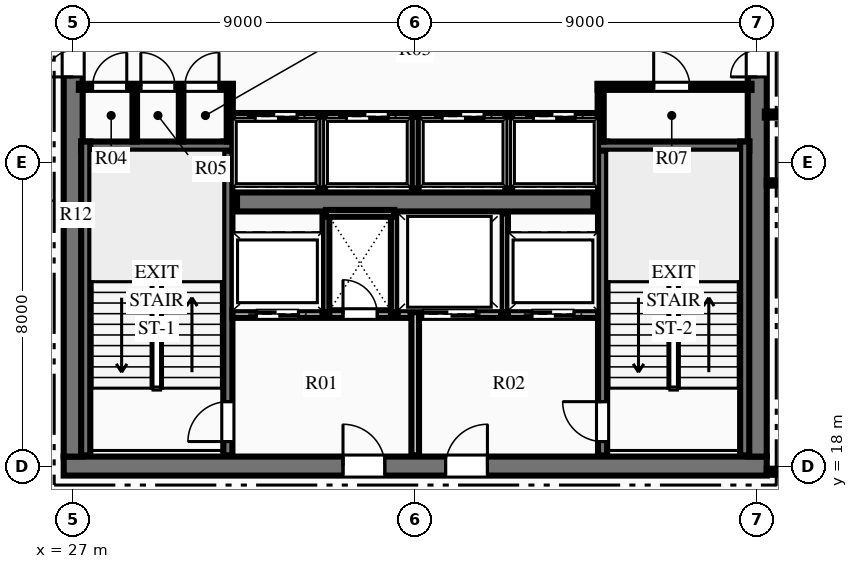
"""IFC4 building model, lengths in metres.
Left out: names, types, materials, properties, quantities, classifications, styles, units other than length and angle.
Written with IfcOpenShell. Run it as: python <this file> out.ifc"""

import sys

from ifc_helpers import new_model, si_unit, direction, frame, frame_2d, origin, place, context, subcontext, project, spatial, rectangle, extrude, element, fill, save


model = new_model("IFC4")
c1 = context("Model", 3, precision=1e-05, world=origin(), true_north=direction((0.0, 1.0)))
c2 = subcontext(c1, "Body", "Model", "MODEL_VIEW")
j1 = project(units=[si_unit("LENGTHUNIT", "METRE"), si_unit("PLANEANGLEUNIT", "RADIAN")], contexts=[c1])
p1 = place(None, origin())
s1 = spatial("IfcSite", under=j1, at=p1, CompositionType="ELEMENT")
p2 = place(p1, origin())
s2 = spatial("IfcBuilding", under=s1, at=p2, CompositionType="ELEMENT")
p3 = place(p2, frame((0.0, 0.0, 163.2)))
s3 = spatial("IfcBuildingStorey", under=s2, at=p3, CompositionType="ELEMENT", Elevation=163.2)
p4 = place(p3, frame((26.75, 18.0, 0.0), z_axis=(0.0, 0.0, 1.0), x_axis=(1.0, 0.0, 0.0)))
e1 = element("IfcWall", 1, at=p4, inside=s3, PredefinedType="SHEAR", context=c2, shape_type="SweptSolid", body=[
    extrude(rectangle(XDim=18.5, YDim=0.5, at=frame_2d((9.25, 0.0))), origin(), (0.0, 0.0, 1.0), 3.75),
])
p5 = place(p4, frame((7.35, 0.0, 0.0)))
e2 = element("IfcOpeningElement", 2, at=p5, cuts=e1, PredefinedType="OPENING", context=c2, shape_type="SweptSolid", body=[
    extrude(rectangle(XDim=1.1, YDim=2.15, at=frame_2d((0.55, 1.075))), frame((0.0, 0.26, 0.0), z_axis=(0.0, -1.0, 0.0), x_axis=(1.0, 0.0, 0.0)), (0.0, 0.0, 1.0), 0.52),
])
p6 = place(p4, frame((10.05, 0.0, 0.0)))
e3 = element("IfcOpeningElement", 3, at=p6, cuts=e1, PredefinedType="OPENING", context=c2, shape_type="SweptSolid", body=[
    extrude(rectangle(XDim=1.1, YDim=2.15, at=frame_2d((0.55, 1.075))), frame((0.0, 0.26, 0.0), z_axis=(0.0, -1.0, 0.0), x_axis=(1.0, 0.0, 0.0)), (0.0, 0.0, 1.0), 0.52),
])
p7 = place(p3, frame((27.0, 18.25, 0.0), z_axis=(0.0, 0.0, 1.0), x_axis=(0.0, 1.0, 0.0)))
e4 = element("IfcWall", 4, at=p7, inside=s3, PredefinedType="SHEAR", context=c2, shape_type="SweptSolid", body=[
    extrude(rectangle(XDim=15.5, YDim=0.5, at=frame_2d((7.75, 0.0))), origin(), (0.0, 0.0, 1.0), 3.75),
])
p8 = place(p7, frame((9.99, 0.0, 0.0)))
e5 = element("IfcOpeningElement", 5, at=p8, cuts=e4, PredefinedType="OPENING", context=c2, shape_type="SweptSolid", body=[
    extrude(rectangle(XDim=1.4, YDim=2.2, at=frame_2d((0.7, 1.1))), frame((0.0, 0.26, 0.0), z_axis=(0.0, -1.0, 0.0), x_axis=(1.0, 0.0, 0.0)), (0.0, 0.0, 1.0), 0.52),
])
p9 = place(p3, frame((45.0, 18.25, 0.0), z_axis=(0.0, 0.0, 1.0), x_axis=(0.0, 1.0, 0.0)))
e6 = element("IfcWall", 6, at=p9, inside=s3, PredefinedType="SHEAR", context=c2, shape_type="SweptSolid", body=[
    extrude(rectangle(XDim=15.5, YDim=0.5, at=frame_2d((7.75, 0.0))), origin(), (0.0, 0.0, 1.0), 3.75),
])
p10 = place(p9, frame((9.99, 0.0, 0.0)))
e7 = element("IfcOpeningElement", 7, at=p10, cuts=e6, PredefinedType="OPENING", context=c2, shape_type="SweptSolid", body=[
    extrude(rectangle(XDim=1.4, YDim=2.2, at=frame_2d((0.7, 1.1))), frame((0.0, 0.26, 0.0), z_axis=(0.0, -1.0, 0.0), x_axis=(1.0, 0.0, 0.0)), (0.0, 0.0, 1.0), 0.52),
])
p11 = place(p3, frame((31.31, 24.95, 0.0), z_axis=(0.0, 0.0, 1.0), x_axis=(1.0, 0.0, 0.0)))
e8 = element("IfcWall", 8, at=p11, inside=s3, PredefinedType="SHEAR", context=c2, shape_type="SweptSolid", body=[
    extrude(rectangle(XDim=9.38, YDim=0.5, at=frame_2d((4.69, 0.0))), origin(), (0.0, 0.0, 1.0), 3.75),
])
p12 = place(p3, frame((31.07, 18.28, 0.0), z_axis=(0.0, 0.0, 1.0), x_axis=(0.0, 1.0, 0.0)))
e9 = element("IfcWall", 9, at=p12, inside=s3, PredefinedType="SHEAR", context=c2, shape_type="SweptSolid", body=[
    extrude(rectangle(XDim=8.26, YDim=0.24, at=frame_2d((4.13, 0.0))), origin(), (0.0, 0.0, 1.0), 3.75),
])
p13 = place(p12, frame((0.365, 0.0, 0.0)))
e10 = element("IfcOpeningElement", 10, at=p13, cuts=e9, PredefinedType="OPENING", context=c2, shape_type="SweptSolid", body=[
    extrude(rectangle(XDim=1.05, YDim=2.15, at=frame_2d((0.525, 1.075))), frame((0.0, 0.13, 0.0), z_axis=(0.0, -1.0, 0.0), x_axis=(1.0, 0.0, 0.0)), (0.0, 0.0, 1.0), 0.26),
])
p14 = place(p3, frame((27.21, 26.42, 0.0), z_axis=(0.0, 0.0, 1.0), x_axis=(1.0, 0.0, 0.0)))
e11 = element("IfcWall", 11, at=p14, inside=s3, PredefinedType="SHEAR", context=c2, shape_type="SweptSolid", body=[
    extrude(rectangle(XDim=3.98, YDim=0.24, at=frame_2d((1.99, 0.0))), origin(), (0.0, 0.0, 1.0), 3.75),
])
p15 = place(p3, frame((27.33, 18.28, 0.0), z_axis=(0.0, 0.0, 1.0), x_axis=(0.0, 1.0, 0.0)))
e12 = element("IfcWall", 12, at=p15, inside=s3, PredefinedType="SHEAR", context=c2, shape_type="SweptSolid", body=[
    extrude(rectangle(XDim=8.26, YDim=0.24, at=frame_2d((4.13, 0.0))), origin(), (0.0, 0.0, 1.0), 3.75),
])
p16 = place(p3, frame((40.93, 18.28, 0.0), z_axis=(0.0, 0.0, 1.0), x_axis=(0.0, 1.0, 0.0)))
e13 = element("IfcWall", 13, at=p16, inside=s3, PredefinedType="SHEAR", context=c2, shape_type="SweptSolid", body=[
    extrude(rectangle(XDim=8.26, YDim=0.24, at=frame_2d((4.13, 0.0))), origin(), (0.0, 0.0, 1.0), 3.75),
])
p17 = place(p16, frame((0.365, 0.0, 0.0)))
e14 = element("IfcOpeningElement", 14, at=p17, cuts=e13, PredefinedType="OPENING", context=c2, shape_type="SweptSolid", body=[
    extrude(rectangle(XDim=1.05, YDim=2.15, at=frame_2d((0.525, 1.075))), frame((0.0, 0.13, 0.0), z_axis=(0.0, -1.0, 0.0), x_axis=(1.0, 0.0, 0.0)), (0.0, 0.0, 1.0), 0.26),
])
p18 = place(p3, frame((40.81, 26.42, 0.0), z_axis=(0.0, 0.0, 1.0), x_axis=(1.0, 0.0, 0.0)))
e15 = element("IfcWall", 15, at=p18, inside=s3, PredefinedType="SHEAR", context=c2, shape_type="SweptSolid", body=[
    extrude(rectangle(XDim=3.98, YDim=0.24, at=frame_2d((1.99, 0.0))), origin(), (0.0, 0.0, 1.0), 3.75),
])
p19 = place(p3, frame((44.67, 18.28, 0.0), z_axis=(0.0, 0.0, 1.0), x_axis=(0.0, 1.0, 0.0)))
e16 = element("IfcWall", 16, at=p19, inside=s3, PredefinedType="SHEAR", context=c2, shape_type="SweptSolid", body=[
    extrude(rectangle(XDim=8.26, YDim=0.24, at=frame_2d((4.13, 0.0))), origin(), (0.0, 0.0, 1.0), 3.75),
])
p20 = place(p3, frame((36.0, 18.28, 0.0), z_axis=(0.0, 0.0, 1.0), x_axis=(0.0, 1.0, 0.0)))
e17 = element("IfcWall", 17, at=p20, inside=s3, PredefinedType="PARTITIONING", context=c2, shape_type="SweptSolid", body=[
    extrude(rectangle(XDim=3.77, YDim=0.2, at=frame_2d((1.885, 0.0))), origin(), (0.0, 0.0, 1.0), 3.46),
])
p21 = place(p3, frame((31.19, 22.0, 0.0), z_axis=(0.0, 0.0, 1.0), x_axis=(1.0, 0.0, 0.0)))
e18 = element("IfcWall", 18, at=p21, inside=s3, PredefinedType="PARTITIONING", context=c2, shape_type="SweptSolid", body=[
    extrude(rectangle(XDim=4.69, YDim=0.2, at=frame_2d((2.345, 0.0))), origin(), (0.0, 0.0, 1.0), 3.46),
])
p22 = place(p21, frame((2.91, 0.0, 0.0)))
e19 = element("IfcOpeningElement", 19, at=p22, cuts=e18, PredefinedType="OPENING", context=c2, shape_type="SweptSolid", body=[
    extrude(rectangle(XDim=0.9, YDim=2.15, at=frame_2d((0.45, 1.075))), frame((0.0, 0.11, 0.0), z_axis=(0.0, -1.0, 0.0), x_axis=(1.0, 0.0, 0.0)), (0.0, 0.0, 1.0), 0.22),
])
p23 = place(p21, frame((0.635, 0.0, 0.0)))
e20 = element("IfcOpeningElement", 20, at=p23, cuts=e18, PredefinedType="OPENING", context=c2, shape_type="SweptSolid", body=[
    extrude(rectangle(XDim=1.1, YDim=2.15, at=frame_2d((0.55, 1.075))), frame((0.0, 0.11, 0.0), z_axis=(0.0, -1.0, 0.0), x_axis=(1.0, 0.0, 0.0)), (0.0, 0.0, 1.0), 0.22),
])
p24 = place(p3, frame((36.12, 22.0, 0.0), z_axis=(0.0, 0.0, 1.0), x_axis=(1.0, 0.0, 0.0)))
e21 = element("IfcWall", 21, at=p24, inside=s3, PredefinedType="PARTITIONING", context=c2, shape_type="SweptSolid", body=[
    extrude(rectangle(XDim=4.69, YDim=0.2, at=frame_2d((2.345, 0.0))), origin(), (0.0, 0.0, 1.0), 3.46),
])
p25 = place(p24, frame((2.955, 0.0, 0.0)))
e22 = element("IfcOpeningElement", 22, at=p25, cuts=e21, PredefinedType="OPENING", context=c2, shape_type="SweptSolid", body=[
    extrude(rectangle(XDim=1.1, YDim=2.15, at=frame_2d((0.55, 1.075))), frame((0.0, 0.11, 0.0), z_axis=(0.0, -1.0, 0.0), x_axis=(1.0, 0.0, 0.0)), (0.0, 0.0, 1.0), 0.22),
])
p26 = place(p24, frame((0.08, 0.0, 0.0)))
e23 = element("IfcOpeningElement", 23, at=p26, cuts=e21, PredefinedType="OPENING", context=c2, shape_type="SweptSolid", body=[
    extrude(rectangle(XDim=1.4, YDim=2.2, at=frame_2d((0.7, 1.1))), frame((0.0, 0.11, 0.0), z_axis=(0.0, -1.0, 0.0), x_axis=(1.0, 0.0, 0.0)), (0.0, 0.0, 1.0), 0.22),
])
for number, where, z_axis, x_axis in (
    (24, (33.65, 22.05, 0.0), (0.0, 0.0, 1.0), (0.0, 1.0, 0.0)),
    (25, (35.45, 22.05, 0.0), (0.0, 0.0, 1.0), (0.0, 1.0, 0.0)),
):
    element("IfcWall", number, at=place(p3, frame(where, z_axis=z_axis, x_axis=x_axis)), inside=s3, PredefinedType="PARTITIONING", context=c2, shape_type="SweptSolid", body=[
        extrude(rectangle(XDim=2.6, YDim=0.18, at=frame_2d((1.3, 0.0))), origin(), (0.0, 0.0, 1.0), 3.46),
    ])
p27 = place(p3, frame((33.65, 24.65, 0.0), z_axis=(0.0, 0.0, 1.0), x_axis=(1.0, 0.0, 0.0)))
e26 = element("IfcWall", 26, at=p27, inside=s3, PredefinedType="PARTITIONING", context=c2, shape_type="SweptSolid", body=[
    extrude(rectangle(XDim=1.8, YDim=0.18, at=frame_2d((0.9, 0.0))), origin(), (0.0, 0.0, 1.0), 3.46),
])
p28 = place(p3, frame((38.35, 22.05, 0.0), z_axis=(0.0, 0.0, 1.0), x_axis=(0.0, 1.0, 0.0)))
e27 = element("IfcWall", 27, at=p28, inside=s3, PredefinedType="PARTITIONING", context=c2, shape_type="SweptSolid", body=[
    extrude(rectangle(XDim=2.6, YDim=0.18, at=frame_2d((1.3, 0.0))), origin(), (0.0, 0.0, 1.0), 3.46),
])
p29 = place(p3, frame((27.15, 27.98, 0.0), z_axis=(0.0, 0.0, 1.0), x_axis=(1.0, 0.0, 0.0)))
e28 = element("IfcWall", 28, at=p29, inside=s3, PredefinedType="PARTITIONING", context=c2, shape_type="SweptSolid", body=[
    extrude(rectangle(XDim=4.05, YDim=0.16, at=frame_2d((2.025, 0.0))), origin(), (0.0, 0.0, 1.0), 3.46),
])
p30 = place(p29, frame((0.36, 0.0, 0.0)))
e29 = element("IfcOpeningElement", 29, at=p30, cuts=e28, PredefinedType="OPENING", context=c2, shape_type="SweptSolid", body=[
    extrude(rectangle(XDim=0.9, YDim=2.15, at=frame_2d((0.45, 1.075))), frame((0.0, 0.09, 0.0), z_axis=(0.0, -1.0, 0.0), x_axis=(1.0, 0.0, 0.0)), (0.0, 0.0, 1.0), 0.18),
])
p31 = place(p29, frame((1.63, 0.0, 0.0)))
e30 = element("IfcOpeningElement", 30, at=p31, cuts=e28, PredefinedType="OPENING", context=c2, shape_type="SweptSolid", body=[
    extrude(rectangle(XDim=0.9, YDim=2.15, at=frame_2d((0.45, 1.075))), frame((0.0, 0.09, 0.0), z_axis=(0.0, -1.0, 0.0), x_axis=(1.0, 0.0, 0.0)), (0.0, 0.0, 1.0), 0.18),
])
p32 = place(p29, frame((2.788, 0.0, 0.0)))
e31 = element("IfcOpeningElement", 31, at=p32, cuts=e28, PredefinedType="OPENING", context=c2, shape_type="SweptSolid", body=[
    extrude(rectangle(XDim=0.9, YDim=2.15, at=frame_2d((0.45, 1.075))), frame((0.0, 0.09, 0.0), z_axis=(0.0, -1.0, 0.0), x_axis=(1.0, 0.0, 0.0)), (0.0, 0.0, 1.0), 0.18),
])
p33 = place(p3, frame((31.12, 26.54, 0.0), z_axis=(0.0, 0.0, 1.0), x_axis=(0.0, 1.0, 0.0)))
e32 = element("IfcWall", 32, at=p33, inside=s3, PredefinedType="PARTITIONING", context=c2, shape_type="SweptSolid", body=[
    extrude(rectangle(XDim=1.51, YDim=0.16, at=frame_2d((0.755, 0.0))), origin(), (0.0, 0.0, 1.0), 3.46),
])
p34 = place(p3, frame((40.8, 27.98, 0.0), z_axis=(0.0, 0.0, 1.0), x_axis=(1.0, 0.0, 0.0)))
e33 = element("IfcWall", 33, at=p34, inside=s3, PredefinedType="PARTITIONING", context=c2, shape_type="SweptSolid", body=[
    extrude(rectangle(XDim=4.05, YDim=0.16, at=frame_2d((2.025, 0.0))), origin(), (0.0, 0.0, 1.0), 3.46),
])
p35 = place(p34, frame((1.475, 0.0, 0.0)))
e34 = element("IfcOpeningElement", 34, at=p35, cuts=e33, PredefinedType="OPENING", context=c2, shape_type="SweptSolid", body=[
    extrude(rectangle(XDim=0.95, YDim=2.15, at=frame_2d((0.475, 1.075))), frame((0.0, 0.09, 0.0), z_axis=(0.0, -1.0, 0.0), x_axis=(1.0, 0.0, 0.0)), (0.0, 0.0, 1.0), 0.18),
])
p36 = place(p3, frame((40.88, 26.54, 0.0), z_axis=(0.0, 0.0, 1.0), x_axis=(0.0, 1.0, 0.0)))
e35 = element("IfcWall", 35, at=p36, inside=s3, PredefinedType="PARTITIONING", context=c2, shape_type="SweptSolid", body=[
    extrude(rectangle(XDim=1.51, YDim=0.16, at=frame_2d((0.755, 0.0))), origin(), (0.0, 0.0, 1.0), 3.46),
])
for number, where, z_axis, x_axis in (
    (36, (28.62, 26.54, 0.0), (0.0, 0.0, 1.0), (0.0, 1.0, 0.0)),
    (37, (29.84, 26.54, 0.0), (0.0, 0.0, 1.0), (0.0, 1.0, 0.0)),
):
    element("IfcWall", number, at=place(p3, frame(where, z_axis=z_axis, x_axis=x_axis)), inside=s3, PredefinedType="PARTITIONING", context=c2, shape_type="SweptSolid", body=[
        extrude(rectangle(XDim=1.44, YDim=0.12, at=frame_2d((0.72, 0.0))), origin(), (0.0, 0.0, 1.0), 3.46),
    ])
p37 = place(p3, frame((31.2, 27.2, 0.0), z_axis=(0.0, 0.0, 1.0), x_axis=(1.0, 0.0, 0.0)))
e38 = element("IfcWall", 38, at=p37, inside=s3, PredefinedType="PARTITIONING", context=c2, shape_type="SweptSolid", body=[
    extrude(rectangle(XDim=9.6, YDim=0.18, at=frame_2d((4.8, 0.0))), origin(), (0.0, 0.0, 1.0), 3.46),
])
p38 = place(p37, frame((0.59, 0.0, 0.0)))
e39 = element("IfcOpeningElement", 39, at=p38, cuts=e38, PredefinedType="OPENING", context=c2, shape_type="SweptSolid", body=[
    extrude(rectangle(XDim=1.1, YDim=2.15, at=frame_2d((0.55, 1.075))), frame((0.0, 0.1, 0.0), z_axis=(0.0, -1.0, 0.0), x_axis=(1.0, 0.0, 0.0)), (0.0, 0.0, 1.0), 0.2),
])
p39 = place(p37, frame((2.99, 0.0, 0.0)))
e40 = element("IfcOpeningElement", 40, at=p39, cuts=e38, PredefinedType="OPENING", context=c2, shape_type="SweptSolid", body=[
    extrude(rectangle(XDim=1.1, YDim=2.15, at=frame_2d((0.55, 1.075))), frame((0.0, 0.1, 0.0), z_axis=(0.0, -1.0, 0.0), x_axis=(1.0, 0.0, 0.0)), (0.0, 0.0, 1.0), 0.2),
])
p40 = place(p37, frame((5.51, 0.0, 0.0)))
e41 = element("IfcOpeningElement", 41, at=p40, cuts=e38, PredefinedType="OPENING", context=c2, shape_type="SweptSolid", body=[
    extrude(rectangle(XDim=1.1, YDim=2.15, at=frame_2d((0.55, 1.075))), frame((0.0, 0.1, 0.0), z_axis=(0.0, -1.0, 0.0), x_axis=(1.0, 0.0, 0.0)), (0.0, 0.0, 1.0), 0.2),
])
p41 = place(p37, frame((7.91, 0.0, 0.0)))
e42 = element("IfcOpeningElement", 42, at=p41, cuts=e38, PredefinedType="OPENING", context=c2, shape_type="SweptSolid", body=[
    extrude(rectangle(XDim=1.1, YDim=2.15, at=frame_2d((0.55, 1.075))), frame((0.0, 0.1, 0.0), z_axis=(0.0, -1.0, 0.0), x_axis=(1.0, 0.0, 0.0)), (0.0, 0.0, 1.0), 0.2),
])
for number, where, z_axis, x_axis in (
    (43, (33.54, 25.3, 0.0), (0.0, 0.0, 1.0), (0.0, 1.0, 0.0)),
    (44, (36.0, 25.3, 0.0), (0.0, 0.0, 1.0), (0.0, 1.0, 0.0)),
    (45, (38.46, 25.3, 0.0), (0.0, 0.0, 1.0), (0.0, 1.0, 0.0)),
):
    element("IfcWall", number, at=place(p3, frame(where, z_axis=z_axis, x_axis=x_axis)), inside=s3, PredefinedType="PARTITIONING", context=c2, shape_type="SweptSolid", body=[
        extrude(rectangle(XDim=1.9, YDim=0.18, at=frame_2d((0.95, 0.0))), origin(), (0.0, 0.0, 1.0), 3.46),
    ])
p42 = place(p3, frame((45.25, 17.85, 0.0), z_axis=(0.0, 0.0, 1.0), x_axis=(1.0, 0.0, 0.0)))
e46 = element("IfcWall", 46, at=p42, inside=s3, PredefinedType="PARTITIONING", context=c2, shape_type="SweptSolid", body=[
    extrude(rectangle(XDim=8.55, YDim=0.16, at=frame_2d((4.275, 0.0))), origin(), (0.0, 0.0, 1.0), 2.839),
])
p43 = place(p42, frame((2.211, 0.0, 0.0)))
e47 = element("IfcOpeningElement", 47, at=p43, cuts=e46, PredefinedType="OPENING", context=c2, shape_type="SweptSolid", body=[
    extrude(rectangle(XDim=1.05, YDim=2.15, at=frame_2d((0.525, 1.075))), frame((0.0, 0.09, 0.0), z_axis=(0.0, -1.0, 0.0), x_axis=(1.0, 0.0, 0.0)), (0.0, 0.0, 1.0), 0.18),
])
p44 = place(p3, frame((45.2, 27.25, 0.0), z_axis=(0.0, 0.0, 1.0), x_axis=(1.0, 0.0, 0.0)))
e48 = element("IfcWall", 48, at=p44, inside=s3, PredefinedType="PARTITIONING", context=c2, shape_type="SweptSolid", body=[
    extrude(rectangle(XDim=2.25, YDim=0.16, at=frame_2d((1.125, 0.0))), origin(), (0.0, 0.0, 1.0), 3.46),
])
p45 = place(p3, frame((45.25, 25.45, 0.0), z_axis=(0.0, 0.0, 1.0), x_axis=(1.0, 0.0, 0.0)))
e49 = element("IfcWall", 49, at=p45, inside=s3, PredefinedType="PARTITIONING", context=c2, shape_type="SweptSolid", body=[
    extrude(rectangle(XDim=20.721, YDim=0.14, at=frame_2d((10.361, 0.0))), origin(), (0.0, 0.0, 1.0), 3.46),
])
p46 = place(p30, origin())
e50 = element("IfcDoor", 50, at=p46, inside=s3, OperationType="SINGLE_SWING_RIGHT", PredefinedType="DOOR", context=c2, shape_type="SweptSolid", body=[
    extrude(rectangle(XDim=0.9, YDim=2.15, at=frame_2d((0.45, 1.075))), frame((0.0, 0.025, 0.0), z_axis=(0.0, -1.0, 0.0), x_axis=(1.0, 0.0, 0.0)), (0.0, 0.0, 1.0), 0.05),
])
fill(e29, e50)
p47 = place(p31, origin())
e51 = element("IfcDoor", 51, at=p47, inside=s3, OperationType="SINGLE_SWING_LEFT", PredefinedType="DOOR", context=c2, shape_type="SweptSolid", body=[
    extrude(rectangle(XDim=0.9, YDim=2.15, at=frame_2d((0.45, 1.075))), frame((0.0, 0.025, 0.0), z_axis=(0.0, -1.0, 0.0), x_axis=(1.0, 0.0, 0.0)), (0.0, 0.0, 1.0), 0.05),
])
fill(e30, e51)
p48 = place(p32, origin())
e52 = element("IfcDoor", 52, at=p48, inside=s3, OperationType="SINGLE_SWING_RIGHT", PredefinedType="DOOR", context=c2, shape_type="SweptSolid", body=[
    extrude(rectangle(XDim=0.9, YDim=2.15, at=frame_2d((0.45, 1.075))), frame((0.0, 0.025, 0.0), z_axis=(0.0, -1.0, 0.0), x_axis=(1.0, 0.0, 0.0)), (0.0, 0.0, 1.0), 0.05),
])
fill(e31, e52)
p49 = place(p35, origin())
e53 = element("IfcDoor", 53, at=p49, inside=s3, OperationType="SINGLE_SWING_LEFT", PredefinedType="DOOR", context=c2, shape_type="SweptSolid", body=[
    extrude(rectangle(XDim=0.95, YDim=2.15, at=frame_2d((0.475, 1.075))), frame((0.0, 0.025, 0.0), z_axis=(0.0, -1.0, 0.0), x_axis=(1.0, 0.0, 0.0)), (0.0, 0.0, 1.0), 0.05),
])
fill(e34, e53)
p50 = place(p13, origin())
e54 = element("IfcDoor", 54, at=p50, inside=s3, OperationType="SINGLE_SWING_LEFT", PredefinedType="DOOR", context=c2, shape_type="SweptSolid", body=[
    extrude(rectangle(XDim=1.05, YDim=2.15, at=frame_2d((0.525, 1.075))), frame((0.0, 0.025, 0.0), z_axis=(0.0, -1.0, 0.0), x_axis=(1.0, 0.0, 0.0)), (0.0, 0.0, 1.0), 0.05),
])
fill(e10, e54)
p51 = place(p17, origin())
e55 = element("IfcDoor", 55, at=p51, inside=s3, OperationType="SINGLE_SWING_RIGHT", PredefinedType="DOOR", context=c2, shape_type="SweptSolid", body=[
    extrude(rectangle(XDim=1.05, YDim=2.15, at=frame_2d((0.525, 1.075))), frame((0.0, 0.025, 0.0), z_axis=(0.0, -1.0, 0.0), x_axis=(1.0, 0.0, 0.0)), (0.0, 0.0, 1.0), 0.05),
])
fill(e14, e55)
p52 = place(p5, origin())
e56 = element("IfcDoor", 56, at=p52, inside=s3, OperationType="SINGLE_SWING_LEFT", PredefinedType="DOOR", context=c2, shape_type="SweptSolid", body=[
    extrude(rectangle(XDim=1.1, YDim=2.15, at=frame_2d((0.55, 1.075))), frame((0.0, 0.025, 0.0), z_axis=(0.0, -1.0, 0.0), x_axis=(1.0, 0.0, 0.0)), (0.0, 0.0, 1.0), 0.05),
])
fill(e2, e56)
p53 = place(p6, origin())
e57 = element("IfcDoor", 57, at=p53, inside=s3, OperationType="SINGLE_SWING_RIGHT", PredefinedType="DOOR", context=c2, shape_type="SweptSolid", body=[
    extrude(rectangle(XDim=1.1, YDim=2.15, at=frame_2d((0.55, 1.075))), frame((0.0, 0.025, 0.0), z_axis=(0.0, -1.0, 0.0), x_axis=(1.0, 0.0, 0.0)), (0.0, 0.0, 1.0), 0.05),
])
fill(e3, e57)
p54 = place(p22, origin())
e58 = element("IfcDoor", 58, at=p54, inside=s3, OperationType="SINGLE_SWING_LEFT", PredefinedType="DOOR", context=c2, shape_type="SweptSolid", body=[
    extrude(rectangle(XDim=0.9, YDim=2.15, at=frame_2d((0.45, 1.075))), frame((0.0, 0.025, 0.0), z_axis=(0.0, -1.0, 0.0), x_axis=(1.0, 0.0, 0.0)), (0.0, 0.0, 1.0), 0.05),
])
fill(e19, e58)
p55 = place(p8, origin())
e59 = element("IfcDoor", 59, at=p55, inside=s3, OperationType="DOUBLE_DOOR_SINGLE_SWING", PredefinedType="DOOR", context=c2, shape_type="SweptSolid", body=[
    extrude(rectangle(XDim=1.4, YDim=2.2, at=frame_2d((0.7, 1.1))), frame((0.0, 0.025, 0.0), z_axis=(0.0, -1.0, 0.0), x_axis=(1.0, 0.0, 0.0)), (0.0, 0.0, 1.0), 0.05),
])
fill(e5, e59)
p56 = place(p10, origin())
e60 = element("IfcDoor", 60, at=p56, inside=s3, OperationType="DOUBLE_DOOR_SINGLE_SWING", PredefinedType="DOOR", context=c2, shape_type="SweptSolid", body=[
    extrude(rectangle(XDim=1.4, YDim=2.2, at=frame_2d((0.7, 1.1))), frame((0.0, 0.025, 0.0), z_axis=(0.0, -1.0, 0.0), x_axis=(1.0, 0.0, 0.0)), (0.0, 0.0, 1.0), 0.05),
])
fill(e7, e60)
p57 = place(p38, origin())
e61 = element("IfcDoor", 61, at=p57, inside=s3, OperationType="SLIDING_TO_LEFT", PredefinedType="DOOR", context=c2, shape_type="SweptSolid", body=[
    extrude(rectangle(XDim=1.1, YDim=2.15, at=frame_2d((0.55, 1.075))), frame((0.0, 0.025, 0.0), z_axis=(0.0, -1.0, 0.0), x_axis=(1.0, 0.0, 0.0)), (0.0, 0.0, 1.0), 0.05),
])
fill(e39, e61)
p58 = place(p39, origin())
e62 = element("IfcDoor", 62, at=p58, inside=s3, OperationType="SLIDING_TO_LEFT", PredefinedType="DOOR", context=c2, shape_type="SweptSolid", body=[
    extrude(rectangle(XDim=1.1, YDim=2.15, at=frame_2d((0.55, 1.075))), frame((0.0, 0.025, 0.0), z_axis=(0.0, -1.0, 0.0), x_axis=(1.0, 0.0, 0.0)), (0.0, 0.0, 1.0), 0.05),
])
fill(e40, e62)
p59 = place(p40, origin())
e63 = element("IfcDoor", 63, at=p59, inside=s3, OperationType="SLIDING_TO_LEFT", PredefinedType="DOOR", context=c2, shape_type="SweptSolid", body=[
    extrude(rectangle(XDim=1.1, YDim=2.15, at=frame_2d((0.55, 1.075))), frame((0.0, 0.025, 0.0), z_axis=(0.0, -1.0, 0.0), x_axis=(1.0, 0.0, 0.0)), (0.0, 0.0, 1.0), 0.05),
])
fill(e41, e63)
p60 = place(p41, origin())
e64 = element("IfcDoor", 64, at=p60, inside=s3, OperationType="SLIDING_TO_LEFT", PredefinedType="DOOR", context=c2, shape_type="SweptSolid", body=[
    extrude(rectangle(XDim=1.1, YDim=2.15, at=frame_2d((0.55, 1.075))), frame((0.0, 0.025, 0.0), z_axis=(0.0, -1.0, 0.0), x_axis=(1.0, 0.0, 0.0)), (0.0, 0.0, 1.0), 0.05),
])
fill(e42, e64)
p61 = place(p23, origin())
e65 = element("IfcDoor", 65, at=p61, inside=s3, OperationType="SLIDING_TO_LEFT", PredefinedType="DOOR", context=c2, shape_type="SweptSolid", body=[
    extrude(rectangle(XDim=1.1, YDim=2.15, at=frame_2d((0.55, 1.075))), frame((0.0, 0.025, 0.0), z_axis=(0.0, -1.0, 0.0), x_axis=(1.0, 0.0, 0.0)), (0.0, 0.0, 1.0), 0.05),
])
fill(e20, e65)
p62 = place(p25, origin())
e66 = element("IfcDoor", 66, at=p62, inside=s3, OperationType="SLIDING_TO_LEFT", PredefinedType="DOOR", context=c2, shape_type="SweptSolid", body=[
    extrude(rectangle(XDim=1.1, YDim=2.15, at=frame_2d((0.55, 1.075))), frame((0.0, 0.025, 0.0), z_axis=(0.0, -1.0, 0.0), x_axis=(1.0, 0.0, 0.0)), (0.0, 0.0, 1.0), 0.05),
])
fill(e22, e66)
p63 = place(p26, origin())
e67 = element("IfcDoor", 67, at=p63, inside=s3, OperationType="SLIDING_TO_LEFT", PredefinedType="DOOR", context=c2, shape_type="SweptSolid", body=[
    extrude(rectangle(XDim=1.4, YDim=2.2, at=frame_2d((0.7, 1.1))), frame((0.0, 0.025, 0.0), z_axis=(0.0, -1.0, 0.0), x_axis=(1.0, 0.0, 0.0)), (0.0, 0.0, 1.0), 0.05),
])
fill(e23, e67)
save(model, sys.argv[1])
